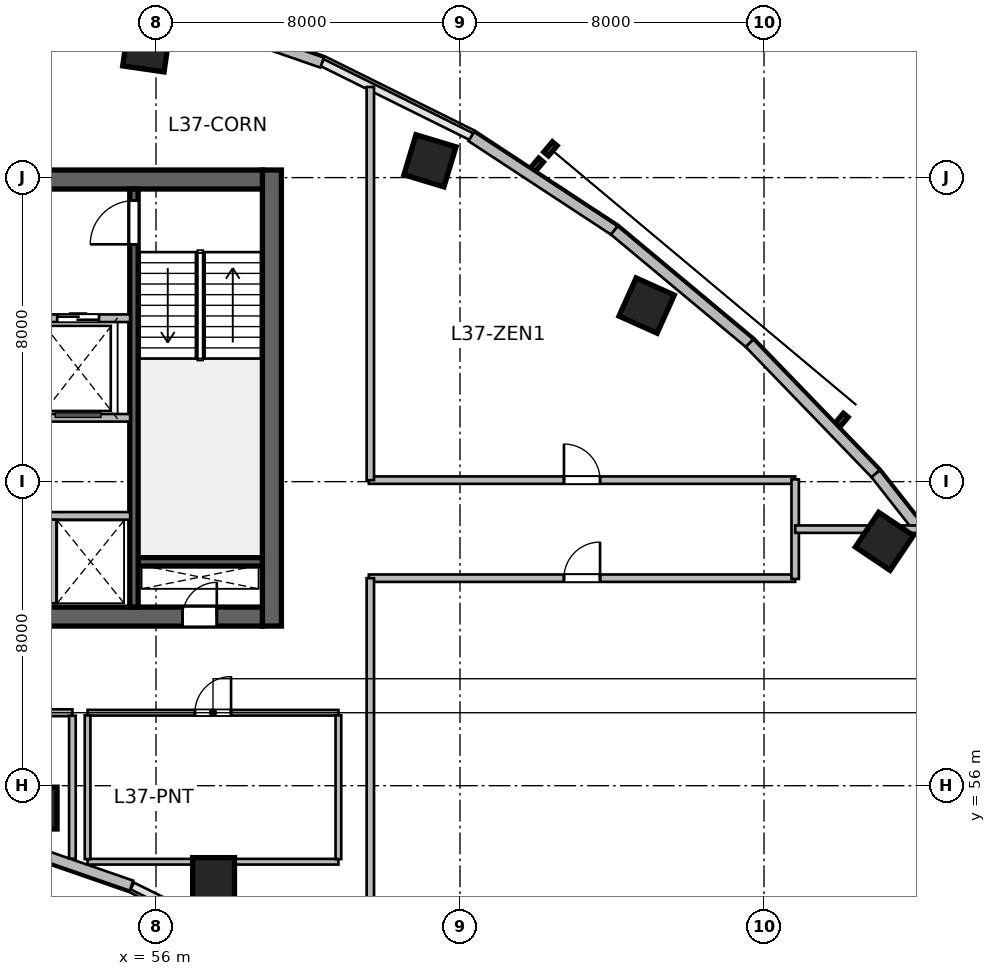
"""IFC4 building model, lengths in metres.
Left out: names, types, materials, properties, quantities, classifications, styles, units other than length and angle.
Written with IfcOpenShell. Run it as: python <this file> out.ifc"""

import sys

from ifc_helpers import new_model, si_unit, direction, frame, frame_2d, origin, origin_2d, place, context, subcontext, project, spatial, rectangle, circle, extrude, source, transform, mapped, element, fill, save


model = new_model("IFC4")
c1 = context("Model", 3, precision=1e-05, world=origin(), true_north=direction((0.0, 1.0)))
c2 = subcontext(c1, "Body", "Model", "MODEL_VIEW")
j1 = project(units=[si_unit("LENGTHUNIT", "METRE"), si_unit("PLANEANGLEUNIT", "RADIAN")], contexts=[c1])
p1 = place(None, origin())
s1 = spatial("IfcSite", under=j1, at=p1, CompositionType="ELEMENT")
p2 = place(p1, origin())
s2 = spatial("IfcBuilding", under=s1, at=p2, CompositionType="ELEMENT")
p3 = place(p2, frame((0.0, 0.0, 154.5)))
s3 = spatial("IfcBuildingStorey", under=s2, at=p3, CompositionType="ELEMENT", Elevation=154.5)
m1 = source(origin(), c2, "Body", "SweptSolid", [
    extrude(rectangle(XDim=12.0, YDim=0.5, at=frame_2d((6.0, 0.0))), origin(), (0.0, 0.0, 1.0), 3.9),
])
p4 = place(p3, frame((59.05, 60.2, 0.0), z_axis=(0.0, 0.0, 1.0), x_axis=(0.0, 1.0, 0.0)))
e1 = element("IfcWall", 1, at=p4, inside=s3, PredefinedType="SHEAR", context=c2, shape_type="MappedRepresentation", body=[
    mapped(m1, transform((0.0, 0.0, 0.0), scale=1.0)),
])
m2 = source(origin(), c2, "Body", "SweptSolid", [
    extrude(rectangle(XDim=21.6, YDim=0.5, at=frame_2d((10.8, 0.0))), origin(), (0.0, 0.0, 1.0), 3.9),
])
p5 = place(p3, frame((37.2, 60.45, 0.0), z_axis=(0.0, 0.0, 1.0), x_axis=(1.0, 0.0, 0.0)))
e2 = element("IfcWall", 2, at=p5, inside=s3, PredefinedType="SHEAR", context=c2, shape_type="MappedRepresentation", body=[
    mapped(m2, transform((0.0, 0.0, 0.0), scale=1.0)),
])
p6 = place(p5, frame((1.1, 0.0, 0.0)))
e3 = element("IfcOpeningElement", 3, at=p6, cuts=e2, PredefinedType="OPENING", context=c2, shape_type="SweptSolid", body=[
    extrude(rectangle(XDim=1.15, YDim=2.15, at=frame_2d((0.575, 1.075))), frame((0.0, 0.26, 0.0), z_axis=(0.0, -1.0, 0.0), x_axis=(1.0, 0.0, 0.0)), (0.0, 0.0, 1.0), 0.52),
])
p7 = place(p5, frame((19.5, 0.0, 0.0)))
e4 = element("IfcOpeningElement", 4, at=p7, cuts=e2, PredefinedType="OPENING", context=c2, shape_type="SweptSolid", body=[
    extrude(rectangle(XDim=0.9, YDim=2.1, at=frame_2d((0.45, 1.05))), frame((0.0, 0.26, 0.0), z_axis=(0.0, -1.0, 0.0), x_axis=(1.0, 0.0, 0.0)), (0.0, 0.0, 1.0), 0.52),
])
p8 = place(p5, frame((12.02, 0.0, 0.0)))
e5 = element("IfcOpeningElement", 5, at=p8, cuts=e2, PredefinedType="OPENING", context=c2, shape_type="SweptSolid", body=[
    extrude(rectangle(XDim=1.6, YDim=2.15, at=frame_2d((0.8, 1.075))), frame((0.0, 0.26, 0.0), z_axis=(0.0, -1.0, 0.0), x_axis=(1.0, 0.0, 0.0)), (0.0, 0.0, 1.0), 0.52),
])
p9 = place(p3, frame((37.2, 71.95, 0.0), z_axis=(0.0, 0.0, 1.0), x_axis=(1.0, 0.0, 0.0)))
e6 = element("IfcWall", 6, at=p9, inside=s3, PredefinedType="SHEAR", context=c2, shape_type="MappedRepresentation", body=[
    mapped(m2, transform((0.0, 0.0, 0.0), scale=1.0)),
])
p10 = place(p9, frame((1.2, 0.0, 0.0)))
e7 = element("IfcOpeningElement", 7, at=p10, cuts=e6, PredefinedType="OPENING", context=c2, shape_type="SweptSolid", body=[
    extrude(rectangle(XDim=0.9, YDim=2.1, at=frame_2d((0.45, 1.05))), frame((0.0, 0.26, 0.0), z_axis=(0.0, -1.0, 0.0), x_axis=(1.0, 0.0, 0.0)), (0.0, 0.0, 1.0), 0.52),
])
p11 = place(p9, frame((14.7, 0.0, 0.0)))
e8 = element("IfcOpeningElement", 8, at=p11, cuts=e6, PredefinedType="OPENING", context=c2, shape_type="SweptSolid", body=[
    extrude(rectangle(XDim=1.2, YDim=2.15, at=frame_2d((0.6, 1.075))), frame((0.0, 0.26, 0.0), z_axis=(0.0, -1.0, 0.0), x_axis=(1.0, 0.0, 0.0)), (0.0, 0.0, 1.0), 0.52),
])
p12 = place(p9, frame((4.15, 0.0, 0.0)))
e9 = element("IfcOpeningElement", 9, at=p12, cuts=e6, PredefinedType="OPENING", context=c2, shape_type="SweptSolid", body=[
    extrude(rectangle(XDim=1.3, YDim=2.15, at=frame_2d((0.65, 1.075))), frame((0.0, 0.26, 0.0), z_axis=(0.0, -1.0, 0.0), x_axis=(1.0, 0.0, 0.0)), (0.0, 0.0, 1.0), 0.52),
])
p13 = place(p9, frame((7.25, 0.0, 0.0)))
e10 = element("IfcOpeningElement", 10, at=p13, cuts=e6, PredefinedType="OPENING", context=c2, shape_type="SweptSolid", body=[
    extrude(rectangle(XDim=0.9, YDim=2.1, at=frame_2d((0.45, 1.05))), frame((0.0, 0.26, 0.0), z_axis=(0.0, -1.0, 0.0), x_axis=(1.0, 0.0, 0.0)), (0.0, 0.0, 1.0), 0.52),
])
m3 = source(origin(), c2, "Body", "SweptSolid", [
    extrude(rectangle(XDim=3.27, YDim=0.22, at=frame_2d((1.635, 0.0))), origin(), (0.0, 0.0, 1.0), 3.9),
])
p14 = place(p3, frame((55.53, 61.89, 0.0), z_axis=(0.0, 0.0, 1.0), x_axis=(1.0, 0.0, 0.0)))
e11 = element("IfcWall", 11, at=p14, inside=s3, PredefinedType="SHEAR", context=c2, shape_type="MappedRepresentation", body=[
    mapped(m3, transform((0.0, 0.0, 0.0), scale=1.0)),
])
m4 = source(origin(), c2, "Body", "SweptSolid", [
    extrude(rectangle(XDim=11.0, YDim=0.22, at=frame_2d((5.5, 0.0))), origin(), (0.0, 0.0, 1.0), 3.9),
])
p15 = place(p3, frame((55.42, 60.7, 0.0), z_axis=(0.0, 0.0, 1.0), x_axis=(0.0, 1.0, 0.0)))
e12 = element("IfcWall", 12, at=p15, inside=s3, PredefinedType="SHEAR", context=c2, shape_type="MappedRepresentation", body=[
    mapped(m4, transform((0.0, 0.0, 0.0), scale=1.0)),
])
p16 = place(p15, frame((9.545, 0.0, 0.0)))
e13 = element("IfcOpeningElement", 13, at=p16, cuts=e12, PredefinedType="OPENING", context=c2, shape_type="SweptSolid", body=[
    extrude(rectangle(XDim=1.15, YDim=2.15, at=frame_2d((0.575, 1.075))), frame((0.0, 0.12, 0.0), z_axis=(0.0, -1.0, 0.0), x_axis=(1.0, 0.0, 0.0)), (0.0, 0.0, 1.0), 0.24),
])
m5 = source(origin(), c2, "Body", "SweptSolid", [
    extrude(circle(Radius=0.55, at=origin_2d()), origin(), (0.0, 0.0, 1.0), 3.9),
])
p17 = place(p3, frame((52.846, 55.411, 0.0), z_axis=(0.0, 0.0, 1.0), x_axis=(0.143492621991, 0.98965138682, 0.0)))
e14 = element("IfcColumn", 14, at=p17, inside=s3, PredefinedType="COLUMN", context=c2, shape_type="MappedRepresentation", body=[
    mapped(m5, transform((0.0, 0.0, 0.0), scale=1.0)),
])
m6 = source(origin(), c2, "Body", "SweptSolid", [
    extrude(rectangle(XDim=1.1, YDim=1.1, at=origin_2d()), origin(), (0.0, 0.0, 1.0), 3.9),
])
p18 = place(p3, frame((55.747, 75.404, 0.0), z_axis=(0.0, 0.0, 1.0), x_axis=(0.143492621991, 0.98965138682, 0.0)))
e15 = element("IfcColumn", 15, at=p18, inside=s3, PredefinedType="COLUMN", context=c2, shape_type="MappedRepresentation", body=[
    mapped(m6, transform((0.0, 0.0, 0.0), scale=1.0)),
])
p19 = place(p3, frame((57.515, 53.558, 0.0), z_axis=(0.0, 0.0, 1.0), x_axis=(0.288697611798, 0.957420330337, 0.0)))
e16 = element("IfcColumn", 16, at=p19, inside=s3, PredefinedType="COLUMN", context=c2, shape_type="MappedRepresentation", body=[
    mapped(m5, transform((0.0, 0.0, 0.0), scale=1.0)),
])
for number, where, z_axis, x_axis in (
    (17, (63.209, 72.442, 0.0), (0.0, 0.0, 1.0), (0.289, 0.957, 0.0)),
    (18, (68.91, 68.633, 0.0), (0.0, 0.0, 1.0), (0.409, 0.912, 0.0)),
    (19, (75.167, 62.43, 0.0), (0.0, 0.0, 1.0), (0.558, 0.83, 0.0)),
):
    element("IfcColumn", number, at=place(p3, frame(where, z_axis=z_axis, x_axis=x_axis)), inside=s3, PredefinedType="COLUMN", context=c2, shape_type="MappedRepresentation", body=[
        mapped(m6, transform((0.0, 0.0, 0.0), scale=1.0)),
    ])
m7 = source(origin(), c2, "Body", "SweptSolid", [
    extrude(rectangle(XDim=2.53, YDim=0.28, at=frame_2d((1.265, 0.0))), origin(), (0.0, 0.0, 1.0), 3.65),
])
p20 = place(p3, frame((55.355, 53.37, 0.0), z_axis=(0.0, 0.0, 1.0), x_axis=(-0.944872429646, 0.327438683872, 0.0)))
e20 = element("IfcWall", 20, at=p20, inside=s3, PredefinedType="SOLIDWALL", context=c2, shape_type="MappedRepresentation", body=[
    mapped(m7, transform((0.0, 0.0, 0.0), scale=1.0)),
])
m8 = source(origin(), c2, "Body", "SweptSolid", [
    extrude(rectangle(XDim=4.29, YDim=0.28, at=frame_2d((2.145, 0.0))), origin(), (0.0, 0.0, 1.0), 3.65),
])
p21 = place(p3, frame((56.317, 76.431, 0.0), z_axis=(0.0, 0.0, 1.0), x_axis=(0.944883859218, -0.3274057003, 0.0)))
e21 = element("IfcWall", 21, at=p21, inside=s3, PredefinedType="SOLIDWALL", context=c2, shape_type="MappedRepresentation", body=[
    mapped(m8, transform((0.0, 0.0, 0.0), scale=1.0)),
])
m9 = source(origin(), c2, "Body", "SweptSolid", [
    extrude(rectangle(XDim=4.501, YDim=0.28, at=frame_2d((2.25, 0.0))), origin(), (0.0, 0.0, 1.0), 3.65),
])
p22 = place(p3, frame((64.298, 73.08, 0.0), z_axis=(0.0, 0.0, 1.0), x_axis=(0.835984920737, -0.548752414391, 0.0)))
e22 = element("IfcWall", 22, at=p22, inside=s3, PredefinedType="SOLIDWALL", context=c2, shape_type="MappedRepresentation", body=[
    mapped(m9, transform((0.0, 0.0, 0.0), scale=1.0)),
])
m10 = source(origin(), c2, "Body", "SweptSolid", [
    extrude(rectangle(XDim=4.634, YDim=0.28, at=frame_2d((2.317, 0.0))), origin(), (0.0, 0.0, 1.0), 3.65),
])
p23 = place(p3, frame((68.061, 70.61, 0.0), z_axis=(0.0, 0.0, 1.0), x_axis=(0.767910229096, -0.640557475993, 0.0)))
e23 = element("IfcWall", 23, at=p23, inside=s3, PredefinedType="SOLIDWALL", context=c2, shape_type="MappedRepresentation", body=[
    mapped(m10, transform((0.0, 0.0, 0.0), scale=1.0)),
])
m11 = source(origin(), c2, "Body", "SweptSolid", [
    extrude(rectangle(XDim=4.776, YDim=0.28, at=frame_2d((2.388, 0.0))), origin(), (0.0, 0.0, 1.0), 3.65),
])
p24 = place(p3, frame((71.619, 67.642, 0.0), z_axis=(0.0, 0.0, 1.0), x_axis=(0.694601811851, -0.719394414055, 0.0)))
e24 = element("IfcWall", 24, at=p24, inside=s3, PredefinedType="SOLIDWALL", context=c2, shape_type="MappedRepresentation", body=[
    mapped(m11, transform((0.0, 0.0, 0.0), scale=1.0)),
])
m12 = source(origin(), c2, "Body", "SweptSolid", [
    extrude(rectangle(XDim=4.922, YDim=0.28, at=frame_2d((2.461, 0.0))), origin(), (0.0, 0.0, 1.0), 3.65),
])
p25 = place(p3, frame((74.936, 64.206, 0.0), z_axis=(0.0, 0.0, 1.0), x_axis=(0.61817639101, -0.786039407153, 0.0)))
e25 = element("IfcWall", 25, at=p25, inside=s3, PredefinedType="SOLIDWALL", context=c2, shape_type="MappedRepresentation", body=[
    mapped(m12, transform((0.0, 0.0, 0.0), scale=1.0)),
])
m13 = source(origin(), c2, "Body", "SweptSolid", [
    extrude(rectangle(XDim=5.62, YDim=0.2, at=frame_2d((2.81, 0.0))), origin(), (0.0, 0.0, 1.0), 3.65),
])
p26 = place(p3, frame((49.7, 68.3, 0.0), z_axis=(0.0, 0.0, 1.0), x_axis=(1.0, 0.0, 0.0)))
e26 = element("IfcWall", 26, at=p26, inside=s3, PredefinedType="SOLIDWALL", context=c2, shape_type="MappedRepresentation", body=[
    mapped(m13, transform((0.0, 0.0, 0.0), scale=1.0)),
])
p27 = place(p26, frame((1.6, 0.0, 0.0)))
e27 = element("IfcOpeningElement", 27, at=p27, cuts=e26, PredefinedType="OPENING", context=c2, shape_type="SweptSolid", body=[
    extrude(rectangle(XDim=1.1, YDim=2.15, at=frame_2d((0.55, 1.075))), frame((0.0, 0.11, 0.0), z_axis=(0.0, -1.0, 0.0), x_axis=(1.0, 0.0, 0.0)), (0.0, 0.0, 1.0), 0.22),
])
p28 = place(p26, frame((3.7, 0.0, 0.0)))
e28 = element("IfcOpeningElement", 28, at=p28, cuts=e26, PredefinedType="OPENING", context=c2, shape_type="SweptSolid", body=[
    extrude(rectangle(XDim=1.1, YDim=2.15, at=frame_2d((0.55, 1.075))), frame((0.0, 0.11, 0.0), z_axis=(0.0, -1.0, 0.0), x_axis=(1.0, 0.0, 0.0)), (0.0, 0.0, 1.0), 0.22),
])
p29 = place(p3, frame((49.7, 65.68, 0.0), z_axis=(0.0, 0.0, 1.0), x_axis=(1.0, 0.0, 0.0)))
e29 = element("IfcWall", 29, at=p29, inside=s3, PredefinedType="SOLIDWALL", context=c2, shape_type="MappedRepresentation", body=[
    mapped(m13, transform((0.0, 0.0, 0.0), scale=1.0)),
])
m14 = source(origin(), c2, "Body", "SweptSolid", [
    extrude(rectangle(XDim=4.1, YDim=0.2, at=frame_2d((2.05, 0.0))), origin(), (0.0, 0.0, 1.0), 3.65),
])
p30 = place(p3, frame((51.22, 63.1, 0.0), z_axis=(0.0, 0.0, 1.0), x_axis=(1.0, 0.0, 0.0)))
e30 = element("IfcWall", 30, at=p30, inside=s3, PredefinedType="SOLIDWALL", context=c2, shape_type="MappedRepresentation", body=[
    mapped(m14, transform((0.0, 0.0, 0.0), scale=1.0)),
])
m15 = source(origin(), c2, "Body", "SweptSolid", [
    extrude(rectangle(XDim=2.2, YDim=0.2, at=frame_2d((1.1, 0.0))), origin(), (0.0, 0.0, 1.0), 3.65),
])
p31 = place(p3, frame((53.28, 60.8, 0.0), z_axis=(0.0, 0.0, 1.0), x_axis=(0.0, 1.0, 0.0)))
e31 = element("IfcWall", 31, at=p31, inside=s3, PredefinedType="SOLIDWALL", context=c2, shape_type="MappedRepresentation", body=[
    mapped(m15, transform((0.0, 0.0, 0.0), scale=1.0)),
])
m16 = source(origin(), c2, "Body", "SweptSolid", [
    extrude(rectangle(XDim=3.248, YDim=0.18, at=frame_2d((1.624, 0.0))), origin(), (0.0, 0.0, 1.0), 3.65),
])
p32 = place(p3, frame((50.552, 57.92, 0.0), z_axis=(0.0, 0.0, 1.0), x_axis=(1.0, 0.0, 0.0)))
e32 = element("IfcWall", 32, at=p32, inside=s3, PredefinedType="PLUMBINGWALL", context=c2, shape_type="MappedRepresentation", body=[
    mapped(m16, transform((0.0, 0.0, 0.0), scale=1.0)),
])
p33 = place(p32, frame((1.149, 0.0, 0.0)))
e33 = element("IfcOpeningElement", 33, at=p33, cuts=e32, PredefinedType="OPENING", context=c2, shape_type="SweptSolid", body=[
    extrude(rectangle(XDim=0.95, YDim=2.12, at=frame_2d((0.475, 1.06))), frame((0.0, 0.1, 0.0), z_axis=(0.0, -1.0, 0.0), x_axis=(1.0, 0.0, 0.0)), (0.0, 0.0, 1.0), 0.2),
])
m17 = source(origin(), c2, "Body", "SweptSolid", [
    extrude(rectangle(XDim=3.763, YDim=0.175, at=frame_2d((1.881, 0.0))), origin(), (0.0, 0.0, 1.0), 3.65),
])
p34 = place(p3, frame((53.8, 54.079, 0.0), z_axis=(0.0, 0.0, 1.0), x_axis=(0.0, 1.0, 0.0)))
e34 = element("IfcWall", 34, at=p34, inside=s3, PredefinedType="PARTITIONING", context=c2, shape_type="MappedRepresentation", body=[
    mapped(m17, transform((0.0, 0.0, 0.0), scale=1.0)),
])
m18 = source(origin(), c2, "Body", "SweptSolid", [
    extrude(rectangle(XDim=6.6, YDim=0.15, at=frame_2d((3.3, 0.0))), origin(), (0.0, 0.0, 1.0), 3.095),
])
p35 = place(p3, frame((54.2, 54.0, 0.0), z_axis=(0.0, 0.0, 1.0), x_axis=(1.0, 0.0, 0.0)))
e35 = element("IfcWall", 35, at=p35, inside=s3, PredefinedType="PARTITIONING", context=c2, shape_type="MappedRepresentation", body=[
    mapped(m18, transform((0.0, 0.0, 0.0), scale=1.0)),
])
m19 = source(origin(), c2, "Body", "SweptSolid", [
    extrude(rectangle(XDim=6.6, YDim=0.15, at=frame_2d((3.3, 0.0))), origin(), (0.0, 0.0, 1.0), 3.65),
])
p36 = place(p3, frame((54.2, 57.92, 0.0), z_axis=(0.0, 0.0, 1.0), x_axis=(1.0, 0.0, 0.0)))
e36 = element("IfcWall", 36, at=p36, inside=s3, PredefinedType="PARTITIONING", context=c2, shape_type="MappedRepresentation", body=[
    mapped(m19, transform((0.0, 0.0, 0.0), scale=1.0)),
])
p37 = place(p36, frame((2.825, 0.0, 0.0)))
e37 = element("IfcOpeningElement", 37, at=p37, cuts=e36, PredefinedType="OPENING", context=c2, shape_type="SweptSolid", body=[
    extrude(rectangle(XDim=0.95, YDim=2.1, at=frame_2d((0.475, 1.05))), frame((0.0, 0.085, 0.0), z_axis=(0.0, -1.0, 0.0), x_axis=(1.0, 0.0, 0.0)), (0.0, 0.0, 1.0), 0.17),
])
m20 = source(origin(), c2, "Body", "SweptSolid", [
    extrude(rectangle(XDim=3.785, YDim=0.15, at=frame_2d((1.893, 0.0))), origin(), (0.0, 0.0, 1.0), 3.65),
])
for number, where, z_axis, x_axis in (
    (38, (54.2, 54.067, 0.0), (0.0, 0.0, 1.0), (0.0, 1.0, 0.0)),
    (39, (60.8, 54.067, 0.0), (0.0, 0.0, 1.0), (0.0, 1.0, 0.0)),
):
    element("IfcWall", number, at=place(p3, frame(where, z_axis=z_axis, x_axis=x_axis)), inside=s3, PredefinedType="PARTITIONING", context=c2, shape_type="MappedRepresentation", body=[
        mapped(m20, transform((0.0, 0.0, 0.0), scale=1.0)),
    ])
m21 = source(origin(), c2, "Body", "SweptSolid", [
    extrude(rectangle(XDim=11.22, YDim=0.195, at=frame_2d((5.61, 0.0))), origin(), (0.0, 0.0, 1.0), 3.65),
])
p38 = place(p3, frame((61.6, 64.04, 0.0), z_axis=(0.0, 0.0, 1.0), x_axis=(1.0, 0.0, 0.0)))
e40 = element("IfcWall", 40, at=p38, inside=s3, PredefinedType="PARTITIONING", context=c2, shape_type="MappedRepresentation", body=[
    mapped(m21, transform((0.0, 0.0, 0.0), scale=1.0)),
])
p39 = place(p38, frame((5.135, 0.0, 0.0)))
e41 = element("IfcOpeningElement", 41, at=p39, cuts=e40, PredefinedType="OPENING", context=c2, shape_type="SweptSolid", body=[
    extrude(rectangle(XDim=0.95, YDim=2.1, at=frame_2d((0.475, 1.05))), frame((0.0, 0.107, 0.0), z_axis=(0.0, -1.0, 0.0), x_axis=(1.0, 0.0, 0.0)), (0.0, 0.0, 1.0), 0.215),
])
p40 = place(p3, frame((61.6, 61.46, 0.0), z_axis=(0.0, 0.0, 1.0), x_axis=(1.0, 0.0, 0.0)))
e42 = element("IfcWall", 42, at=p40, inside=s3, PredefinedType="PARTITIONING", context=c2, shape_type="MappedRepresentation", body=[
    mapped(m21, transform((0.0, 0.0, 0.0), scale=1.0)),
])
p41 = place(p40, frame((5.135, 0.0, 0.0)))
e43 = element("IfcOpeningElement", 43, at=p41, cuts=e42, PredefinedType="OPENING", context=c2, shape_type="SweptSolid", body=[
    extrude(rectangle(XDim=0.95, YDim=2.1, at=frame_2d((0.475, 1.05))), frame((0.0, 0.107, 0.0), z_axis=(0.0, -1.0, 0.0), x_axis=(1.0, 0.0, 0.0)), (0.0, 0.0, 1.0), 0.215),
])
m22 = source(origin(), c2, "Body", "SweptSolid", [
    extrude(rectangle(XDim=12.126, YDim=0.195, at=frame_2d((6.063, 0.0))), origin(), (0.0, 0.0, 1.0), 2.942),
])
p42 = place(p3, frame((61.64, 49.334, 0.0), z_axis=(0.0, 0.0, 1.0), x_axis=(0.0, 1.0, 0.0)))
e44 = element("IfcWall", 44, at=p42, inside=s3, PredefinedType="PARTITIONING", context=c2, shape_type="MappedRepresentation", body=[
    mapped(m22, transform((0.0, 0.0, 0.0), scale=1.0)),
])
m23 = source(origin(), c2, "Body", "SweptSolid", [
    extrude(rectangle(XDim=10.346, YDim=0.195, at=frame_2d((5.173, 0.0))), origin(), (0.0, 0.0, 1.0), 3.65),
])
p43 = place(p3, frame((61.64, 64.04, 0.0), z_axis=(0.0, 0.0, 1.0), x_axis=(0.0, 1.0, 0.0)))
e45 = element("IfcWall", 45, at=p43, inside=s3, PredefinedType="PARTITIONING", context=c2, shape_type="MappedRepresentation", body=[
    mapped(m23, transform((0.0, 0.0, 0.0), scale=1.0)),
])
m24 = source(origin(), c2, "Body", "SweptSolid", [
    extrude(rectangle(XDim=2.62, YDim=0.195, at=frame_2d((1.31, 0.0))), origin(), (0.0, 0.0, 1.0), 3.022),
])
p44 = place(p3, frame((72.82, 61.44, 0.0), z_axis=(0.0, 0.0, 1.0), x_axis=(0.0, 1.0, 0.0)))
e46 = element("IfcWall", 46, at=p44, inside=s3, PredefinedType="PARTITIONING", context=c2, shape_type="MappedRepresentation", body=[
    mapped(m24, transform((0.0, 0.0, 0.0), scale=1.0)),
])
m25 = source(origin(), c2, "Body", "SweptSolid", [
    extrude(rectangle(XDim=3.249, YDim=0.195, at=frame_2d((1.625, 0.0))), origin(), (0.0, 0.0, 1.0), 3.65),
])
p45 = place(p3, frame((72.82, 62.75, 0.0), z_axis=(0.0, 0.0, 1.0), x_axis=(1.0, 0.0, 0.0)))
e47 = element("IfcWall", 47, at=p45, inside=s3, PredefinedType="PARTITIONING", context=c2, shape_type="MappedRepresentation", body=[
    mapped(m25, transform((0.0, 0.0, 0.0), scale=1.0)),
])
m26 = source(origin(), c2, "Body", "SweptSolid", [
    extrude(rectangle(XDim=0.9, YDim=2.1, at=frame_2d((0.45, 1.05))), frame((0.0, 0.025, 0.0), z_axis=(0.0, -1.0, 0.0), x_axis=(1.0, 0.0, 0.0)), (0.0, 0.0, 1.0), 0.05),
])
p46 = place(p7, origin())
e48 = element("IfcDoor", 48, at=p46, inside=s3, OperationType="SINGLE_SWING_RIGHT", PredefinedType="DOOR", context=c2, shape_type="MappedRepresentation", body=[
    mapped(m26, transform((0.0, 0.0, 0.0), scale=1.0)),
])
fill(e4, e48)
m27 = source(origin(), c2, "Body", "SweptSolid", [
    extrude(rectangle(XDim=1.15, YDim=2.15, at=frame_2d((0.575, 1.075))), frame((0.0, 0.025, 0.0), z_axis=(0.0, -1.0, 0.0), x_axis=(1.0, 0.0, 0.0)), (0.0, 0.0, 1.0), 0.05),
])
p47 = place(p16, origin())
e49 = element("IfcDoor", 49, at=p47, inside=s3, OperationType="SINGLE_SWING_LEFT", PredefinedType="DOOR", context=c2, shape_type="MappedRepresentation", body=[
    mapped(m27, transform((0.0, 0.0, 0.0), scale=1.0)),
])
fill(e13, e49)
m28 = source(origin(), c2, "Body", "SweptSolid", [
    extrude(rectangle(XDim=1.1, YDim=2.15, at=frame_2d((0.55, 1.075))), frame((0.0, 0.025, 0.0), z_axis=(0.0, -1.0, 0.0), x_axis=(1.0, 0.0, 0.0)), (0.0, 0.0, 1.0), 0.05),
])
p48 = place(p28, origin())
e50 = element("IfcDoor", 50, at=p48, inside=s3, OperationType="DOUBLE_DOOR_SLIDING", PredefinedType="DOOR", context=c2, shape_type="MappedRepresentation", body=[
    mapped(m28, transform((0.0, 0.0, 0.0), scale=1.0)),
])
fill(e28, e50)
m29 = source(origin(), c2, "Body", "SweptSolid", [
    extrude(rectangle(XDim=0.95, YDim=2.1, at=frame_2d((0.475, 1.05))), frame((0.0, 0.025, 0.0), z_axis=(0.0, -1.0, 0.0), x_axis=(1.0, 0.0, 0.0)), (0.0, 0.0, 1.0), 0.05),
])
p49 = place(p37, origin())
e51 = element("IfcDoor", 51, at=p49, inside=s3, OperationType="SINGLE_SWING_RIGHT", PredefinedType="DOOR", context=c2, shape_type="MappedRepresentation", body=[
    mapped(m29, transform((0.0, 0.0, 0.0), scale=1.0)),
])
fill(e37, e51)
p50 = place(p39, origin())
e52 = element("IfcDoor", 52, at=p50, inside=s3, OperationType="SINGLE_SWING_LEFT", PredefinedType="DOOR", context=c2, shape_type="MappedRepresentation", body=[
    mapped(m29, transform((0.0, 0.0, 0.0), scale=1.0)),
])
fill(e41, e52)
p51 = place(p41, origin())
e53 = element("IfcDoor", 53, at=p51, inside=s3, OperationType="SINGLE_SWING_RIGHT", PredefinedType="DOOR", context=c2, shape_type="MappedRepresentation", body=[
    mapped(m29, transform((0.0, 0.0, 0.0), scale=1.0)),
])
fill(e43, e53)
save(model, sys.argv[1])
